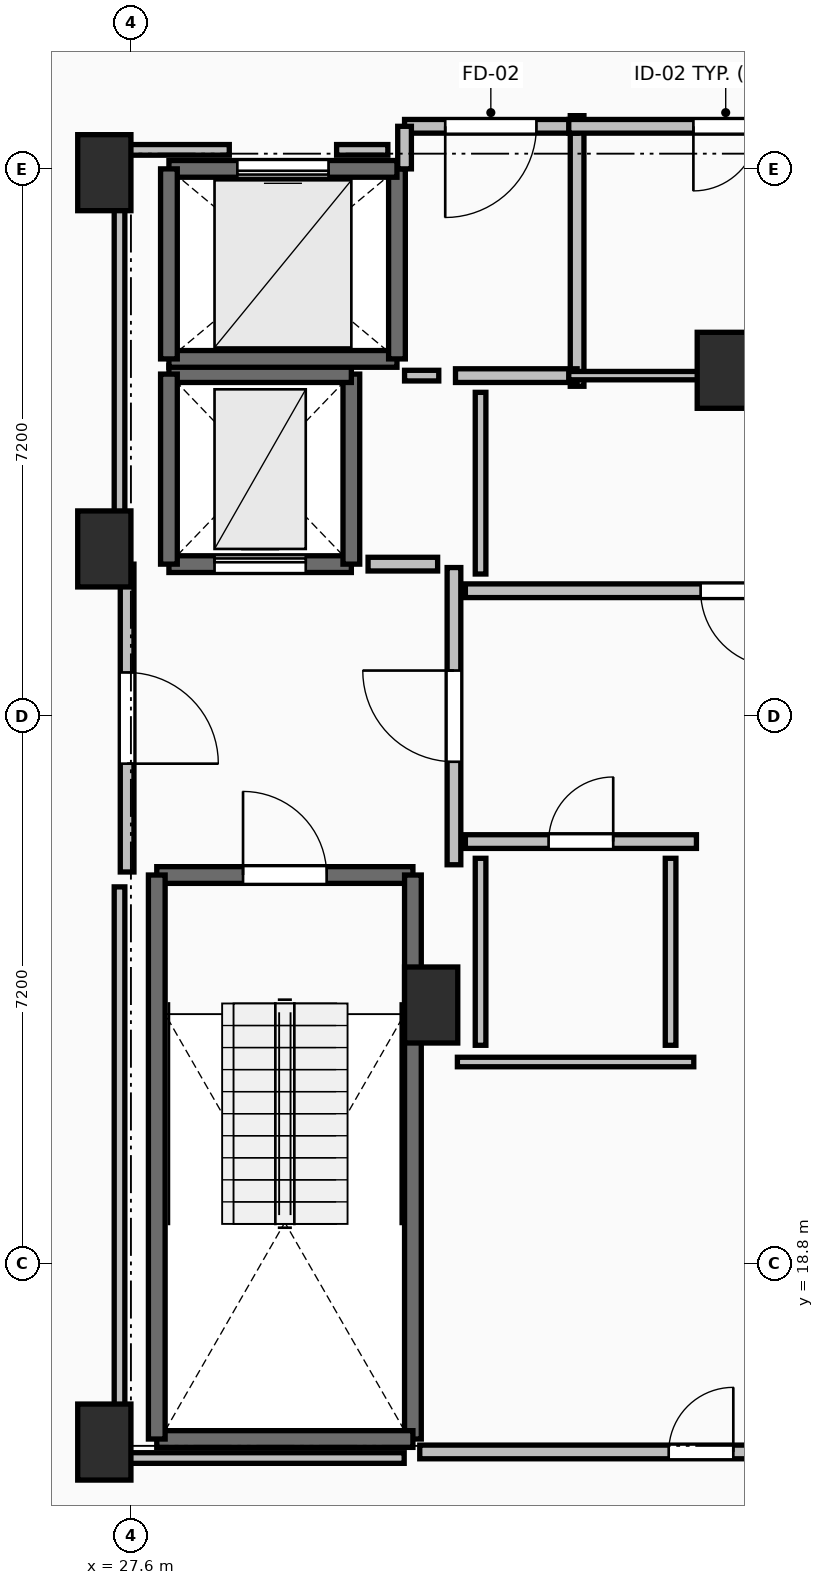
"""IFC4 building model, lengths in metres.
Left out: names, types, materials, properties, quantities, classifications, styles, units other than length and angle.
Written with IfcOpenShell. Run it as: python <this file> out.ifc"""

import sys

from ifc_helpers import new_model, si_unit, direction, frame, frame_2d, origin, origin_2d, place, context, subcontext, project, spatial, rectangle, extrude, element, fill, save


model = new_model("IFC4")
c1 = context("Model", 3, precision=1e-05, world=origin(), true_north=direction((0.0, 1.0)))
c2 = subcontext(c1, "Body", "Model", "MODEL_VIEW")
j1 = project(units=[si_unit("LENGTHUNIT", "METRE"), si_unit("PLANEANGLEUNIT", "RADIAN")], contexts=[c1])
p1 = place(None, origin())
s1 = spatial("IfcSite", under=j1, at=p1, CompositionType="ELEMENT")
p2 = place(p1, origin())
s2 = spatial("IfcBuilding", under=s1, at=p2, CompositionType="ELEMENT")
p3 = place(p2, frame((0.0, 0.0, 269.75)))
s3 = spatial("IfcBuildingStorey", under=s2, at=p3, CompositionType="ELEMENT", Elevation=269.75)
for number, where, z_axis, x_axis in (
    (1, (27.25, 16.45, 0.0), (0.0, 0.0, 1.0), (1.0, 0.0, 0.0)),
    (2, (27.25, 28.2, 0.0), (0.0, 0.0, 1.0), (1.0, 0.0, 0.0)),
    (3, (27.25, 33.15, 0.0), (0.0, 0.0, 1.0), (1.0, 0.0, 0.0)),
    (4, (31.55, 22.2, 0.0), (0.0, 0.0, 1.0), (1.0, 0.0, 0.0)),
    (5, (35.4, 30.55, 0.0), (0.0, 0.0, 1.0), (1.0, 0.0, 0.0)),
):
    element("IfcColumn", number, at=place(p3, frame(where, z_axis=z_axis, x_axis=x_axis)), inside=s3, PredefinedType="PILASTER", context=c2, shape_type="SweptSolid", body=[
        extrude(rectangle(XDim=0.7, YDim=1.0, at=origin_2d()), origin(), (0.0, 0.0, 1.0), 3.55),
    ])
p4 = place(p3, frame((27.94, 23.91, 0.0), z_axis=(0.0, 0.0, 1.0), x_axis=(1.0, 0.0, 0.0)))
e6 = element("IfcWall", 6, at=p4, inside=s3, PredefinedType="SOLIDWALL", context=c2, shape_type="SweptSolid", body=[
    extrude(rectangle(XDim=3.37, YDim=0.22, at=frame_2d((1.685, 0.0))), origin(), (0.0, 0.0, 1.0), 3.29),
])
p5 = place(p4, frame((1.135, 0.0, 0.0)))
e7 = element("IfcOpeningElement", 7, at=p5, cuts=e6, PredefinedType="OPENING", context=c2, shape_type="SweptSolid", body=[
    extrude(rectangle(XDim=1.1, YDim=2.15, at=frame_2d((0.55, 1.075))), frame((0.0, 0.125, 0.0), z_axis=(0.0, -1.0, 0.0), x_axis=(1.0, 0.0, 0.0)), (0.0, 0.0, 1.0), 0.25),
])
p6 = place(p3, frame((31.31, 23.91, 0.0), z_axis=(0.0, 0.0, 1.0), x_axis=(0.0, -1.0, 0.0)))
e8 = element("IfcWall", 8, at=p6, inside=s3, PredefinedType="SOLIDWALL", context=c2, shape_type="SweptSolid", body=[
    extrude(rectangle(XDim=7.42, YDim=0.22, at=frame_2d((3.71, 0.0))), origin(), (0.0, 0.0, 1.0), 3.29),
])
p7 = place(p3, frame((31.31, 16.49, 0.0), z_axis=(0.0, 0.0, 1.0), x_axis=(-1.0, 0.0, 0.0)))
e9 = element("IfcWall", 9, at=p7, inside=s3, PredefinedType="SOLIDWALL", context=c2, shape_type="SweptSolid", body=[
    extrude(rectangle(XDim=3.37, YDim=0.22, at=frame_2d((1.685, 0.0))), origin(), (0.0, 0.0, 1.0), 3.29),
])
p8 = place(p3, frame((27.94, 16.49, 0.0), z_axis=(0.0, 0.0, 1.0), x_axis=(0.0, 1.0, 0.0)))
e10 = element("IfcWall", 10, at=p8, inside=s3, PredefinedType="SOLIDWALL", context=c2, shape_type="SweptSolid", body=[
    extrude(rectangle(XDim=7.42, YDim=0.22, at=frame_2d((3.71, 0.0))), origin(), (0.0, 0.0, 1.0), 3.29),
])
p9 = place(p3, frame((28.1, 28.0, 0.0), z_axis=(0.0, 0.0, 1.0), x_axis=(1.0, 0.0, 0.0)))
e11 = element("IfcWall", 11, at=p9, inside=s3, PredefinedType="SHEAR", context=c2, shape_type="SweptSolid", body=[
    extrude(rectangle(XDim=2.4, YDim=0.22, at=frame_2d((1.2, 0.0))), origin(), (0.0, 0.0, 1.0), 3.29),
])
p10 = place(p9, frame((0.6, 0.0, 0.0)))
e12 = element("IfcOpeningElement", 12, at=p10, cuts=e11, PredefinedType="OPENING", context=c2, shape_type="SweptSolid", body=[
    extrude(rectangle(XDim=1.2, YDim=2.2, at=frame_2d((0.6, 1.1))), frame((0.0, 0.125, 0.0), z_axis=(0.0, -1.0, 0.0), x_axis=(1.0, 0.0, 0.0)), (0.0, 0.0, 1.0), 0.25),
])
p11 = place(p3, frame((30.5, 28.0, 0.0), z_axis=(0.0, 0.0, 1.0), x_axis=(0.0, 1.0, 0.0)))
e13 = element("IfcWall", 13, at=p11, inside=s3, PredefinedType="SHEAR", context=c2, shape_type="SweptSolid", body=[
    extrude(rectangle(XDim=2.5, YDim=0.22, at=frame_2d((1.25, 0.0))), origin(), (0.0, 0.0, 1.0), 3.29),
])
p12 = place(p3, frame((30.5, 30.5, 0.0), z_axis=(0.0, 0.0, 1.0), x_axis=(-1.0, 0.0, 0.0)))
e14 = element("IfcWall", 14, at=p12, inside=s3, PredefinedType="SHEAR", context=c2, shape_type="SweptSolid", body=[
    extrude(rectangle(XDim=2.4, YDim=0.22, at=frame_2d((1.2, 0.0))), origin(), (0.0, 0.0, 1.0), 3.29),
])
p13 = place(p3, frame((28.1, 30.5, 0.0), z_axis=(0.0, 0.0, 1.0), x_axis=(0.0, -1.0, 0.0)))
e15 = element("IfcWall", 15, at=p13, inside=s3, PredefinedType="SHEAR", context=c2, shape_type="SweptSolid", body=[
    extrude(rectangle(XDim=2.5, YDim=0.22, at=frame_2d((1.25, 0.0))), origin(), (0.0, 0.0, 1.0), 3.29),
])
p14 = place(p3, frame((28.1, 30.7, 0.0), z_axis=(0.0, 0.0, 1.0), x_axis=(1.0, 0.0, 0.0)))
e16 = element("IfcWall", 16, at=p14, inside=s3, PredefinedType="SOLIDWALL", context=c2, shape_type="SweptSolid", body=[
    extrude(rectangle(XDim=3.0, YDim=0.22, at=frame_2d((1.5, 0.0))), origin(), (0.0, 0.0, 1.0), 3.29),
])
p15 = place(p3, frame((31.1, 30.7, 0.0), z_axis=(0.0, 0.0, 1.0), x_axis=(0.0, 1.0, 0.0)))
e17 = element("IfcWall", 17, at=p15, inside=s3, PredefinedType="SOLIDWALL", context=c2, shape_type="SweptSolid", body=[
    extrude(rectangle(XDim=2.5, YDim=0.22, at=frame_2d((1.25, 0.0))), origin(), (0.0, 0.0, 1.0), 3.29),
])
p16 = place(p3, frame((31.1, 33.2, 0.0), z_axis=(0.0, 0.0, 1.0), x_axis=(-1.0, 0.0, 0.0)))
e18 = element("IfcWall", 18, at=p16, inside=s3, PredefinedType="SOLIDWALL", context=c2, shape_type="SweptSolid", body=[
    extrude(rectangle(XDim=3.0, YDim=0.22, at=frame_2d((1.5, 0.0))), origin(), (0.0, 0.0, 1.0), 3.29),
])
p17 = place(p16, frame((0.9, 0.0, 0.0)))
e19 = element("IfcOpeningElement", 19, at=p17, cuts=e18, PredefinedType="OPENING", context=c2, shape_type="SweptSolid", body=[
    extrude(rectangle(XDim=1.2, YDim=2.2, at=frame_2d((0.6, 1.1))), frame((0.0, 0.125, 0.0), z_axis=(0.0, -1.0, 0.0), x_axis=(1.0, 0.0, 0.0)), (0.0, 0.0, 1.0), 0.25),
])
p18 = place(p3, frame((28.1, 33.2, 0.0), z_axis=(0.0, 0.0, 1.0), x_axis=(0.0, -1.0, 0.0)))
e20 = element("IfcWall", 20, at=p18, inside=s3, PredefinedType="SOLIDWALL", context=c2, shape_type="SweptSolid", body=[
    extrude(rectangle(XDim=2.5, YDim=0.22, at=frame_2d((1.25, 0.0))), origin(), (0.0, 0.0, 1.0), 3.29),
])
p19 = place(p3, frame((31.85, 24.045, 0.0), z_axis=(0.0, 0.0, 1.0), x_axis=(0.0, 1.0, 0.0)))
e21 = element("IfcWall", 21, at=p19, inside=s3, PredefinedType="PARTITIONING", context=c2, shape_type="SweptSolid", body=[
    extrude(rectangle(XDim=3.91, YDim=0.18, at=frame_2d((1.955, 0.0))), origin(), (0.0, 0.0, 1.0), 3.29),
])
p20 = place(p19, frame((1.355, 0.0, 0.0)))
e22 = element("IfcOpeningElement", 22, at=p20, cuts=e21, PredefinedType="OPENING", context=c2, shape_type="SweptSolid", body=[
    extrude(rectangle(XDim=1.2, YDim=2.15, at=frame_2d((0.6, 1.075))), frame((0.0, 0.105, 0.0), z_axis=(0.0, -1.0, 0.0), x_axis=(1.0, 0.0, 0.0)), (0.0, 0.0, 1.0), 0.21),
])
p21 = place(p3, frame((27.55, 28.0, 0.0), z_axis=(0.0, 0.0, 1.0), x_axis=(0.0, -1.0, 0.0)))
e23 = element("IfcWall", 23, at=p21, inside=s3, PredefinedType="PARTITIONING", context=c2, shape_type="SweptSolid", body=[
    extrude(rectangle(XDim=4.05, YDim=0.18, at=frame_2d((2.025, 0.0))), origin(), (0.0, 0.0, 1.0), 3.29),
])
p22 = place(p21, frame((1.425, 0.0, 0.0)))
e24 = element("IfcOpeningElement", 24, at=p22, cuts=e23, PredefinedType="OPENING", context=c2, shape_type="SweptSolid", body=[
    extrude(rectangle(XDim=1.2, YDim=2.15, at=frame_2d((0.6, 1.075))), frame((0.0, 0.105, 0.0), z_axis=(0.0, -1.0, 0.0), x_axis=(1.0, 0.0, 0.0)), (0.0, 0.0, 1.0), 0.21),
])
p23 = place(p3, frame((33.47, 30.34, 0.0), z_axis=(0.0, 0.0, 1.0), x_axis=(0.0, 1.0, 0.0)))
e25 = element("IfcWall", 25, at=p23, inside=s3, PredefinedType="PARTITIONING", context=c2, shape_type="SweptSolid", body=[
    extrude(rectangle(XDim=3.56, YDim=0.18, at=frame_2d((1.78, 0.0))), origin(), (0.0, 0.0, 1.0), 3.29),
])
p24 = place(p3, frame((31.87, 30.48, 0.0), z_axis=(0.0, 0.0, 1.0), x_axis=(1.0, 0.0, 0.0)))
e26 = element("IfcWall", 26, at=p24, inside=s3, PredefinedType="PARTITIONING", context=c2, shape_type="SweptSolid", body=[
    extrude(rectangle(XDim=1.6, YDim=0.18, at=frame_2d((0.8, 0.0))), origin(), (0.0, 0.0, 1.0), 3.29),
])
p25 = place(p3, frame((33.47, 33.76, 0.0), z_axis=(0.0, 0.0, 1.0), x_axis=(-1.0, 0.0, 0.0)))
e27 = element("IfcWall", 27, at=p25, inside=s3, PredefinedType="PARTITIONING", context=c2, shape_type="SweptSolid", body=[
    extrude(rectangle(XDim=2.27, YDim=0.18, at=frame_2d((1.135, 0.0))), origin(), (0.0, 0.0, 1.0), 3.29),
])
p26 = place(p25, frame((0.535, 0.0, 0.0)))
e28 = element("IfcOpeningElement", 28, at=p26, cuts=e27, PredefinedType="OPENING", context=c2, shape_type="SweptSolid", body=[
    extrude(rectangle(XDim=1.2, YDim=2.15, at=frame_2d((0.6, 1.075))), frame((0.0, 0.105, 0.0), z_axis=(0.0, -1.0, 0.0), x_axis=(1.0, 0.0, 0.0)), (0.0, 0.0, 1.0), 0.21),
])
p27 = place(p3, frame((31.2, 33.76, 0.0), z_axis=(0.0, 0.0, 1.0), x_axis=(0.0, -1.0, 0.0)))
e29 = element("IfcWall", 29, at=p27, inside=s3, PredefinedType="PARTITIONING", context=c2, shape_type="SweptSolid", body=[
    extrude(rectangle(XDim=0.56, YDim=0.18, at=frame_2d((0.28, 0.0))), origin(), (0.0, 0.0, 1.0), 3.29),
])
p28 = place(p3, frame((39.19, 27.65, 0.0), z_axis=(0.0, 0.0, 1.0), x_axis=(-1.0, 0.0, 0.0)))
e30 = element("IfcWall", 30, at=p28, inside=s3, PredefinedType="PARTITIONING", context=c2, shape_type="SweptSolid", body=[
    extrude(rectangle(XDim=7.19, YDim=0.18, at=frame_2d((3.595, 0.0))), origin(), (0.0, 0.0, 1.0), 3.29),
])
p29 = place(p28, frame((3.095, 0.0, 0.0)))
e31 = element("IfcOpeningElement", 31, at=p29, cuts=e30, PredefinedType="OPENING", context=c2, shape_type="SweptSolid", body=[
    extrude(rectangle(XDim=1.0, YDim=2.15, at=frame_2d((0.5, 1.075))), frame((0.0, 0.105, 0.0), z_axis=(0.0, -1.0, 0.0), x_axis=(1.0, 0.0, 0.0)), (0.0, 0.0, 1.0), 0.21),
])
p30 = place(p3, frame((32.0, 24.35, 0.0), z_axis=(0.0, 0.0, 1.0), x_axis=(1.0, 0.0, 0.0)))
e32 = element("IfcWall", 32, at=p30, inside=s3, PredefinedType="PARTITIONING", context=c2, shape_type="SweptSolid", body=[
    extrude(rectangle(XDim=3.04, YDim=0.18, at=frame_2d((1.52, 0.0))), origin(), (0.0, 0.0, 1.0), 3.29),
])
p31 = place(p30, frame((1.095, 0.0, 0.0)))
e33 = element("IfcOpeningElement", 33, at=p31, cuts=e32, PredefinedType="OPENING", context=c2, shape_type="SweptSolid", body=[
    extrude(rectangle(XDim=0.85, YDim=2.1, at=frame_2d((0.425, 1.05))), frame((0.0, 0.105, 0.0), z_axis=(0.0, -1.0, 0.0), x_axis=(1.0, 0.0, 0.0)), (0.0, 0.0, 1.0), 0.21),
])
p32 = place(p3, frame((33.36, 30.48, 0.0), z_axis=(0.0, 0.0, 1.0), x_axis=(1.0, 0.0, 0.0)))
e34 = element("IfcWall", 34, at=p32, inside=s3, PredefinedType="PARTITIONING", context=c2, shape_type="SweptSolid", body=[
    extrude(rectangle(XDim=4.115, YDim=0.11, at=frame_2d((2.058, 0.0))), origin(), (0.0, 0.0, 1.0), 2.482),
])
p33 = place(p3, frame((37.49, 33.76, 0.0), z_axis=(0.0, 0.0, 1.0), x_axis=(-1.0, 0.0, 0.0)))
e35 = element("IfcWall", 35, at=p33, inside=s3, PredefinedType="PARTITIONING", context=c2, shape_type="SweptSolid", body=[
    extrude(rectangle(XDim=4.13, YDim=0.18, at=frame_2d((2.065, 0.0))), origin(), (0.0, 0.0, 1.0), 3.29),
])
p34 = place(p33, frame((1.64, 0.0, 0.0)))
e36 = element("IfcOpeningElement", 36, at=p34, cuts=e35, PredefinedType="OPENING", context=c2, shape_type="SweptSolid", body=[
    extrude(rectangle(XDim=0.85, YDim=2.1, at=frame_2d((0.425, 1.05))), frame((0.0, 0.105, 0.0), z_axis=(0.0, -1.0, 0.0), x_axis=(1.0, 0.0, 0.0)), (0.0, 0.0, 1.0), 0.21),
])
p35 = place(p3, frame((35.005, 21.45, 0.0), z_axis=(0.0, 0.0, 1.0), x_axis=(-1.0, 0.0, 0.0)))
e37 = element("IfcWall", 37, at=p35, inside=s3, PredefinedType="PARTITIONING", context=c2, shape_type="SweptSolid", body=[
    extrude(rectangle(XDim=3.11, YDim=0.125, at=frame_2d((1.555, 0.0))), origin(), (0.0, 0.0, 1.0), 3.29),
])
p36 = place(p3, frame((31.4, 16.32, 0.0), z_axis=(0.0, 0.0, 1.0), x_axis=(1.0, 0.0, 0.0)))
e38 = element("IfcWall", 38, at=p36, inside=s3, PredefinedType="PARTITIONING", context=c2, shape_type="SweptSolid", body=[
    extrude(rectangle(XDim=7.4, YDim=0.18, at=frame_2d((3.7, 0.0))), origin(), (0.0, 0.0, 1.0), 3.29),
])
p37 = place(p36, frame((3.275, 0.0, 0.0)))
e39 = element("IfcOpeningElement", 39, at=p37, cuts=e38, PredefinedType="OPENING", context=c2, shape_type="SweptSolid", body=[
    extrude(rectangle(XDim=0.85, YDim=2.1, at=frame_2d((0.425, 1.05))), frame((0.0, 0.105, 0.0), z_axis=(0.0, -1.0, 0.0), x_axis=(1.0, 0.0, 0.0)), (0.0, 0.0, 1.0), 0.21),
])
p38 = place(p3, frame((31.635, 28.0, 0.0), z_axis=(0.0, 0.0, 1.0), x_axis=(-1.0, 0.0, 0.0)))
e40 = element("IfcWall", 40, at=p38, inside=s3, PredefinedType="PARTITIONING", context=c2, shape_type="SweptSolid", body=[
    extrude(rectangle(XDim=0.915, YDim=0.18, at=frame_2d((0.458, 0.0))), origin(), (0.0, 0.0, 1.0), 3.29),
])
p39 = place(p3, frame((31.2, 30.48, 0.0), z_axis=(0.0, 0.0, 1.0), x_axis=(1.0, 0.0, 0.0)))
e41 = element("IfcWall", 41, at=p39, inside=s3, PredefinedType="PARTITIONING", context=c2, shape_type="SweptSolid", body=[
    extrude(rectangle(XDim=0.45, YDim=0.14, at=frame_2d((0.225, 0.0))), origin(), (0.0, 0.0, 1.0), 3.29),
])
p40 = place(p3, frame((32.2, 30.26, 0.0), z_axis=(0.0, 0.0, 1.0), x_axis=(0.0, -1.0, 0.0)))
e42 = element("IfcWall", 42, at=p40, inside=s3, PredefinedType="PARTITIONING", context=c2, shape_type="SweptSolid", body=[
    extrude(rectangle(XDim=2.39, YDim=0.14, at=frame_2d((1.195, 0.0))), origin(), (0.0, 0.0, 1.0), 3.29),
])
for number, where, z_axis, x_axis in (
    (43, (32.2, 24.13, 0.0), (0.0, 0.0, 1.0), (0.0, -1.0, 0.0)),
    (44, (34.7, 21.67, 0.0), (0.0, 0.0, 1.0), (0.0, 1.0, 0.0)),
):
    element("IfcWall", number, at=place(p3, frame(where, z_axis=z_axis, x_axis=x_axis)), inside=s3, PredefinedType="PARTITIONING", context=c2, shape_type="SweptSolid", body=[
        extrude(rectangle(XDim=2.46, YDim=0.14, at=frame_2d((1.23, 0.0))), origin(), (0.0, 0.0, 1.0), 2.482),
    ])
p41 = place(p3, frame((30.98, 33.45, 0.0), z_axis=(0.0, 0.0, 1.0), x_axis=(-1.0, 0.0, 0.0)))
e45 = element("IfcWall", 45, at=p41, inside=s3, PredefinedType="PARTITIONING", context=c2, shape_type="SweptSolid", body=[
    extrude(rectangle(XDim=0.674, YDim=0.14, at=frame_2d((0.337, 0.0))), origin(), (0.0, 0.0, 1.0), 3.29),
])
p42 = place(p3, frame((28.894, 33.45, 0.0), z_axis=(0.0, 0.0, 1.0), x_axis=(-1.0, 0.0, 0.0)))
e46 = element("IfcWall", 46, at=p42, inside=s3, PredefinedType="PARTITIONING", context=c2, shape_type="SweptSolid", body=[
    extrude(rectangle(XDim=1.444, YDim=0.14, at=frame_2d((0.722, 0.0))), origin(), (0.0, 0.0, 1.0), 2.482),
])
p43 = place(p3, frame((27.45, 33.45, 0.0), z_axis=(0.0, 0.0, 1.0), x_axis=(0.0, -1.0, 0.0)))
e47 = element("IfcWall", 47, at=p43, inside=s3, PredefinedType="PARTITIONING", context=c2, shape_type="SweptSolid", body=[
    extrude(rectangle(XDim=5.254, YDim=0.14, at=frame_2d((2.627, 0.0))), origin(), (0.0, 0.0, 1.0), 2.482),
])
p44 = place(p3, frame((27.45, 23.754, 0.0), z_axis=(0.0, 0.0, 1.0), x_axis=(0.0, -1.0, 0.0)))
e48 = element("IfcWall", 48, at=p44, inside=s3, PredefinedType="PARTITIONING", context=c2, shape_type="SweptSolid", body=[
    extrude(rectangle(XDim=7.514, YDim=0.14, at=frame_2d((3.757, 0.0))), origin(), (0.0, 0.0, 1.0), 2.482),
])
p45 = place(p3, frame((27.45, 16.24, 0.0), z_axis=(0.0, 0.0, 1.0), x_axis=(1.0, 0.0, 0.0)))
e49 = element("IfcWall", 49, at=p45, inside=s3, PredefinedType="PARTITIONING", context=c2, shape_type="SweptSolid", body=[
    extrude(rectangle(XDim=3.745, YDim=0.14, at=frame_2d((1.873, 0.0))), origin(), (0.0, 0.0, 1.0), 2.482),
])
p46 = place(p5, origin())
e50 = element("IfcDoor", 50, at=p46, inside=s3, OperationType="SINGLE_SWING_LEFT", PredefinedType="DOOR", context=c2, shape_type="SweptSolid", body=[
    extrude(rectangle(XDim=1.1, YDim=2.15, at=frame_2d((0.55, 1.075))), frame((0.0, 0.025, 0.0), z_axis=(0.0, -1.0, 0.0), x_axis=(1.0, 0.0, 0.0)), (0.0, 0.0, 1.0), 0.05),
])
fill(e7, e50)
p47 = place(p10, origin())
e51 = element("IfcDoor", 51, at=p47, inside=s3, OperationType="SLIDING_TO_LEFT", PredefinedType="DOOR", context=c2, shape_type="SweptSolid", body=[
    extrude(rectangle(XDim=1.2, YDim=2.2, at=frame_2d((0.6, 1.1))), frame((0.0, 0.025, 0.0), z_axis=(0.0, -1.0, 0.0), x_axis=(1.0, 0.0, 0.0)), (0.0, 0.0, 1.0), 0.05),
])
fill(e12, e51)
p48 = place(p17, origin())
e52 = element("IfcDoor", 52, at=p48, inside=s3, OperationType="SLIDING_TO_LEFT", PredefinedType="DOOR", context=c2, shape_type="SweptSolid", body=[
    extrude(rectangle(XDim=1.2, YDim=2.2, at=frame_2d((0.6, 1.1))), frame((0.0, 0.025, 0.0), z_axis=(0.0, -1.0, 0.0), x_axis=(1.0, 0.0, 0.0)), (0.0, 0.0, 1.0), 0.05),
])
fill(e19, e52)
p49 = place(p20, origin())
e53 = element("IfcDoor", 53, at=p49, inside=s3, OperationType="SINGLE_SWING_RIGHT", PredefinedType="DOOR", context=c2, shape_type="SweptSolid", body=[
    extrude(rectangle(XDim=1.2, YDim=2.15, at=frame_2d((0.6, 1.075))), frame((0.0, 0.025, 0.0), z_axis=(0.0, -1.0, 0.0), x_axis=(1.0, 0.0, 0.0)), (0.0, 0.0, 1.0), 0.05),
])
fill(e22, e53)
p50 = place(p22, origin())
e54 = element("IfcDoor", 54, at=p50, inside=s3, OperationType="SINGLE_SWING_RIGHT", PredefinedType="DOOR", context=c2, shape_type="SweptSolid", body=[
    extrude(rectangle(XDim=1.2, YDim=2.15, at=frame_2d((0.6, 1.075))), frame((0.0, 0.025, 0.0), z_axis=(0.0, -1.0, 0.0), x_axis=(1.0, 0.0, 0.0)), (0.0, 0.0, 1.0), 0.05),
])
fill(e24, e54)
p51 = place(p26, origin())
e55 = element("IfcDoor", 55, at=p51, inside=s3, OperationType="SINGLE_SWING_RIGHT", PredefinedType="DOOR", context=c2, shape_type="SweptSolid", body=[
    extrude(rectangle(XDim=1.2, YDim=2.15, at=frame_2d((0.6, 1.075))), frame((0.0, 0.025, 0.0), z_axis=(0.0, -1.0, 0.0), x_axis=(1.0, 0.0, 0.0)), (0.0, 0.0, 1.0), 0.05),
])
fill(e28, e55)
p52 = place(p29, origin())
e56 = element("IfcDoor", 56, at=p52, inside=s3, OperationType="SINGLE_SWING_LEFT", PredefinedType="DOOR", context=c2, shape_type="SweptSolid", body=[
    extrude(rectangle(XDim=1.0, YDim=2.15, at=frame_2d((0.5, 1.075))), frame((0.0, 0.025, 0.0), z_axis=(0.0, -1.0, 0.0), x_axis=(1.0, 0.0, 0.0)), (0.0, 0.0, 1.0), 0.05),
])
fill(e31, e56)
p53 = place(p31, origin())
e57 = element("IfcDoor", 57, at=p53, inside=s3, OperationType="SINGLE_SWING_RIGHT", PredefinedType="DOOR", context=c2, shape_type="SweptSolid", body=[
    extrude(rectangle(XDim=0.85, YDim=2.1, at=frame_2d((0.425, 1.05))), frame((0.0, 0.025, 0.0), z_axis=(0.0, -1.0, 0.0), x_axis=(1.0, 0.0, 0.0)), (0.0, 0.0, 1.0), 0.05),
])
fill(e33, e57)
p54 = place(p34, origin())
e58 = element("IfcDoor", 58, at=p54, inside=s3, OperationType="SINGLE_SWING_RIGHT", PredefinedType="DOOR", context=c2, shape_type="SweptSolid", body=[
    extrude(rectangle(XDim=0.85, YDim=2.1, at=frame_2d((0.425, 1.05))), frame((0.0, 0.025, 0.0), z_axis=(0.0, -1.0, 0.0), x_axis=(1.0, 0.0, 0.0)), (0.0, 0.0, 1.0), 0.05),
])
fill(e36, e58)
p55 = place(p37, origin())
e59 = element("IfcDoor", 59, at=p55, inside=s3, OperationType="SINGLE_SWING_RIGHT", PredefinedType="DOOR", context=c2, shape_type="SweptSolid", body=[
    extrude(rectangle(XDim=0.85, YDim=2.1, at=frame_2d((0.425, 1.05))), frame((0.0, 0.025, 0.0), z_axis=(0.0, -1.0, 0.0), x_axis=(1.0, 0.0, 0.0)), (0.0, 0.0, 1.0), 0.05),
])
fill(e39, e59)
save(model, sys.argv[1])
